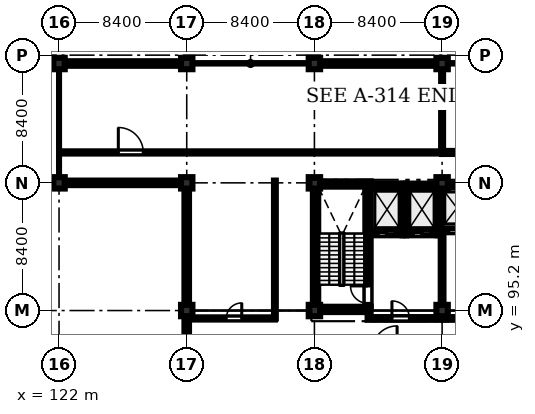
"""IFC4 building model, lengths in metres.
Left out: names, types, materials, properties, quantities, classifications, styles, units other than length and angle.
Written with IfcOpenShell. Run it as: python <this file> out.ifc"""

import sys

from ifc_helpers import new_model, si_unit, direction, frame, frame_2d, origin, origin_2d, place, context, subcontext, project, spatial, rectangle, extrude, element, fill, save


model = new_model("IFC4")
c1 = context("Model", 3, precision=1e-05, world=origin(), true_north=direction((0.0, 1.0)))
c2 = subcontext(c1, "Body", "Model", "MODEL_VIEW")
j1 = project(units=[si_unit("LENGTHUNIT", "METRE"), si_unit("PLANEANGLEUNIT", "RADIAN")], contexts=[c1])
p1 = place(None, origin())
s1 = spatial("IfcSite", under=j1, at=p1, CompositionType="ELEMENT")
p2 = place(p1, origin())
s2 = spatial("IfcBuilding", under=s1, at=p2, CompositionType="ELEMENT")
p3 = place(p2, frame((0.0, 0.0, 48.6)))
s3 = spatial("IfcBuildingStorey", under=s2, at=p3, CompositionType="ELEMENT", Elevation=48.6)
for number, where, z_axis, x_axis in (
    (1, (122.0, 103.6, 0.0), (0.0, 0.0, 1.0), (1.0, 0.0, 0.0)),
    (2, (122.0, 111.45, 0.0), (0.0, 0.0, 1.0), (1.0, 0.0, 0.0)),
    (3, (130.4, 95.2, 0.0), (0.0, 0.0, 1.0), (1.0, 0.0, 0.0)),
    (4, (130.4, 103.6, 0.0), (0.0, 0.0, 1.0), (1.0, 0.0, 0.0)),
    (5, (130.4, 111.45, 0.0), (0.0, 0.0, 1.0), (1.0, 0.0, 0.0)),
    (6, (138.8, 95.2, 0.0), (0.0, 0.0, 1.0), (1.0, 0.0, 0.0)),
    (7, (138.8, 103.6, 0.0), (0.0, 0.0, 1.0), (1.0, 0.0, 0.0)),
    (8, (138.8, 111.45, 0.0), (0.0, 0.0, 1.0), (1.0, 0.0, 0.0)),
    (9, (147.2, 95.2, 0.0), (0.0, 0.0, 1.0), (1.0, 0.0, 0.0)),
    (10, (147.2, 103.6, 0.0), (0.0, 0.0, 1.0), (1.0, 0.0, 0.0)),
    (11, (147.2, 111.45, 0.0), (0.0, 0.0, 1.0), (1.0, 0.0, 0.0)),
):
    element("IfcColumn", number, at=place(p3, frame(where, z_axis=z_axis, x_axis=x_axis)), inside=s3, PredefinedType="COLUMN", context=c2, shape_type="SweptSolid", body=[
        extrude(rectangle(XDim=0.75, YDim=0.75, at=origin_2d()), origin(), (0.0, 0.0, 1.0), 4.03),
    ])
for number, where, z_axis, x_axis in (
    (12, (138.7, 95.275, 0.0), (0.0, 0.0, 1.0), (1.0, 0.0, 0.0)),
    (13, (138.7, 103.525, 0.0), (0.0, 0.0, 1.0), (1.0, 0.0, 0.0)),
):
    element("IfcWall", number, at=place(p3, frame(where, z_axis=z_axis, x_axis=x_axis)), inside=s3, PredefinedType="SHEAR", context=c2, shape_type="SweptSolid", body=[
        extrude(rectangle(XDim=3.8, YDim=0.35, at=frame_2d((1.9, 0.0))), origin(), (0.0, 0.0, 1.0), 4.03),
    ])
p4 = place(p3, frame((138.875, 95.45, 0.0), z_axis=(0.0, 0.0, 1.0), x_axis=(0.0, 1.0, 0.0)))
e14 = element("IfcWall", 14, at=p4, inside=s3, PredefinedType="SHEAR", context=c2, shape_type="SweptSolid", body=[
    extrude(rectangle(XDim=7.9, YDim=0.35, at=frame_2d((3.95, 0.0))), origin(), (0.0, 0.0, 1.0), 4.03),
])
p5 = place(p3, frame((142.325, 95.45, 0.0), z_axis=(0.0, 0.0, 1.0), x_axis=(0.0, 1.0, 0.0)))
e15 = element("IfcWall", 15, at=p5, inside=s3, PredefinedType="SHEAR", context=c2, shape_type="SweptSolid", body=[
    extrude(rectangle(XDim=7.9, YDim=0.35, at=frame_2d((3.95, 0.0))), origin(), (0.0, 0.0, 1.0), 4.03),
])
p6 = place(p5, frame((0.22, 0.0, 0.0)))
e16 = element("IfcOpeningElement", 16, at=p6, cuts=e15, PredefinedType="OPENING", context=c2, shape_type="SweptSolid", body=[
    extrude(rectangle(XDim=1.15, YDim=2.15, at=frame_2d((0.575, 1.075))), frame((0.0, 0.185, 0.0), z_axis=(0.0, -1.0, 0.0), x_axis=(1.0, 0.0, 0.0)), (0.0, 0.0, 1.0), 0.37),
])
p7 = place(p3, frame((142.5, 100.275, 0.0), z_axis=(0.0, 0.0, 1.0), x_axis=(1.0, 0.0, 0.0)))
e17 = element("IfcWall", 17, at=p7, inside=s3, PredefinedType="SHEAR", context=c2, shape_type="SweptSolid", body=[
    extrude(rectangle(XDim=2.1, YDim=0.25, at=frame_2d((1.05, 0.0))), origin(), (0.0, 0.0, 1.0), 4.03),
])
p8 = place(p7, frame((0.5, 0.0, 0.0)))
e18 = element("IfcOpeningElement", 18, at=p8, cuts=e17, PredefinedType="OPENING", context=c2, shape_type="SweptSolid", body=[
    extrude(rectangle(XDim=1.1, YDim=2.15, at=frame_2d((0.55, 1.075))), frame((0.0, 0.135, 0.0), z_axis=(0.0, -1.0, 0.0), x_axis=(1.0, 0.0, 0.0)), (0.0, 0.0, 1.0), 0.27),
])
p9 = place(p3, frame((142.5, 103.425, 0.0), z_axis=(0.0, 0.0, 1.0), x_axis=(1.0, 0.0, 0.0)))
e19 = element("IfcWall", 19, at=p9, inside=s3, PredefinedType="SHEAR", context=c2, shape_type="SweptSolid", body=[
    extrude(rectangle(XDim=2.1, YDim=0.25, at=frame_2d((1.05, 0.0))), origin(), (0.0, 0.0, 1.0), 4.03),
])
p10 = place(p3, frame((144.725, 100.15, 0.0), z_axis=(0.0, 0.0, 1.0), x_axis=(0.0, 1.0, 0.0)))
e20 = element("IfcWall", 20, at=p10, inside=s3, PredefinedType="SHEAR", context=c2, shape_type="SweptSolid", body=[
    extrude(rectangle(XDim=3.4, YDim=0.25, at=frame_2d((1.7, 0.0))), origin(), (0.0, 0.0, 1.0), 4.03),
])
p11 = place(p3, frame((144.85, 100.275, 0.0), z_axis=(0.0, 0.0, 1.0), x_axis=(1.0, 0.0, 0.0)))
e21 = element("IfcWall", 21, at=p11, inside=s3, PredefinedType="SHEAR", context=c2, shape_type="SweptSolid", body=[
    extrude(rectangle(XDim=2.05, YDim=0.25, at=frame_2d((1.025, 0.0))), origin(), (0.0, 0.0, 1.0), 4.03),
])
p12 = place(p11, frame((0.465, 0.0, 0.0)))
e22 = element("IfcOpeningElement", 22, at=p12, cuts=e21, PredefinedType="OPENING", context=c2, shape_type="SweptSolid", body=[
    extrude(rectangle(XDim=1.12, YDim=2.15, at=frame_2d((0.56, 1.075))), frame((0.0, 0.135, 0.0), z_axis=(0.0, -1.0, 0.0), x_axis=(1.0, 0.0, 0.0)), (0.0, 0.0, 1.0), 0.27),
])
p13 = place(p3, frame((144.85, 103.425, 0.0), z_axis=(0.0, 0.0, 1.0), x_axis=(1.0, 0.0, 0.0)))
e23 = element("IfcWall", 23, at=p13, inside=s3, PredefinedType="SHEAR", context=c2, shape_type="SweptSolid", body=[
    extrude(rectangle(XDim=2.05, YDim=0.25, at=frame_2d((1.025, 0.0))), origin(), (0.0, 0.0, 1.0), 4.03),
])
p14 = place(p3, frame((147.025, 100.15, 0.0), z_axis=(0.0, 0.0, 1.0), x_axis=(0.0, 1.0, 0.0)))
e24 = element("IfcWall", 24, at=p14, inside=s3, PredefinedType="SHEAR", context=c2, shape_type="SweptSolid", body=[
    extrude(rectangle(XDim=3.4, YDim=0.25, at=frame_2d((1.7, 0.0))), origin(), (0.0, 0.0, 1.0), 4.03),
])
p15 = place(p3, frame((147.15, 100.475, 0.0), z_axis=(0.0, 0.0, 1.0), x_axis=(1.0, 0.0, 0.0)))
e25 = element("IfcWall", 25, at=p15, inside=s3, PredefinedType="SHEAR", context=c2, shape_type="SweptSolid", body=[
    extrude(rectangle(XDim=2.05, YDim=0.25, at=frame_2d((1.025, 0.0))), origin(), (0.0, 0.0, 1.0), 4.03),
])
p16 = place(p15, frame((0.495, 0.0, 0.0)))
e26 = element("IfcOpeningElement", 26, at=p16, cuts=e25, PredefinedType="OPENING", context=c2, shape_type="SweptSolid", body=[
    extrude(rectangle(XDim=1.06, YDim=2.15, at=frame_2d((0.53, 1.075))), frame((0.0, 0.135, 0.0), z_axis=(0.0, -1.0, 0.0), x_axis=(1.0, 0.0, 0.0)), (0.0, 0.0, 1.0), 0.27),
])
p17 = place(p3, frame((147.15, 103.425, 0.0), z_axis=(0.0, 0.0, 1.0), x_axis=(1.0, 0.0, 0.0)))
e27 = element("IfcWall", 27, at=p17, inside=s3, PredefinedType="SHEAR", context=c2, shape_type="SweptSolid", body=[
    extrude(rectangle(XDim=2.05, YDim=0.25, at=frame_2d((1.025, 0.0))), origin(), (0.0, 0.0, 1.0), 4.03),
])
p18 = place(p3, frame((122.375, 111.45, 0.0), z_axis=(0.0, 0.0, 1.0), x_axis=(1.0, 0.0, 0.0)))
e28 = element("IfcWall", 28, at=p18, inside=s3, PredefinedType="STANDARD", context=c2, shape_type="SweptSolid", body=[
    extrude(rectangle(XDim=7.65, YDim=0.3, at=frame_2d((3.825, 0.0))), origin(), (0.0, 0.0, 1.0), 3.33),
])
p19 = place(p18, frame((0.85, 0.0, 0.9)))
e29 = element("IfcOpeningElement", 29, at=p19, cuts=e28, PredefinedType="OPENING", context=c2, shape_type="SweptSolid", body=[
    extrude(rectangle(XDim=1.6, YDim=2.0, at=frame_2d((0.8, 1.0))), frame((0.0, 0.16, 0.0), z_axis=(0.0, -1.0, 0.0), x_axis=(1.0, 0.0, 0.0)), (0.0, 0.0, 1.0), 0.32),
])
p20 = place(p18, frame((4.65, 0.0, 0.9)))
e30 = element("IfcOpeningElement", 30, at=p20, cuts=e28, PredefinedType="OPENING", context=c2, shape_type="SweptSolid", body=[
    extrude(rectangle(XDim=1.6, YDim=2.0, at=frame_2d((0.8, 1.0))), frame((0.0, 0.16, 0.0), z_axis=(0.0, -1.0, 0.0), x_axis=(1.0, 0.0, 0.0)), (0.0, 0.0, 1.0), 0.32),
])
p21 = place(p3, frame((139.175, 111.45, 0.0), z_axis=(0.0, 0.0, 1.0), x_axis=(1.0, 0.0, 0.0)))
e31 = element("IfcWall", 31, at=p21, inside=s3, PredefinedType="STANDARD", context=c2, shape_type="SweptSolid", body=[
    extrude(rectangle(XDim=7.65, YDim=0.3, at=frame_2d((3.825, 0.0))), origin(), (0.0, 0.0, 1.0), 3.33),
])
p22 = place(p21, frame((0.85, 0.0, 0.9)))
e32 = element("IfcOpeningElement", 32, at=p22, cuts=e31, PredefinedType="OPENING", context=c2, shape_type="SweptSolid", body=[
    extrude(rectangle(XDim=1.6, YDim=2.0, at=frame_2d((0.8, 1.0))), frame((0.0, 0.16, 0.0), z_axis=(0.0, -1.0, 0.0), x_axis=(1.0, 0.0, 0.0)), (0.0, 0.0, 1.0), 0.32),
])
p23 = place(p21, frame((4.65, 0.0, 0.9)))
e33 = element("IfcOpeningElement", 33, at=p23, cuts=e31, PredefinedType="OPENING", context=c2, shape_type="SweptSolid", body=[
    extrude(rectangle(XDim=1.6, YDim=2.0, at=frame_2d((0.8, 1.0))), frame((0.0, 0.16, 0.0), z_axis=(0.0, -1.0, 0.0), x_axis=(1.0, 0.0, 0.0)), (0.0, 0.0, 1.0), 0.32),
])
p24 = place(p3, frame((130.4, 92.15, 0.0), z_axis=(0.0, 0.0, 1.0), x_axis=(0.0, 1.0, 0.0)))
e34 = element("IfcWall", 34, at=p24, inside=s3, PredefinedType="STANDARD", context=c2, shape_type="SweptSolid", body=[
    extrude(rectangle(XDim=2.675, YDim=0.3, at=frame_2d((1.337, 0.0))), origin(), (0.0, 0.0, 1.0), 4.03),
])
p25 = place(p3, frame((130.4, 95.575, 0.0), z_axis=(0.0, 0.0, 1.0), x_axis=(0.0, 1.0, 0.0)))
e35 = element("IfcWall", 35, at=p25, inside=s3, PredefinedType="STANDARD", context=c2, shape_type="SweptSolid", body=[
    extrude(rectangle(XDim=7.65, YDim=0.3, at=frame_2d((3.825, 0.0))), origin(), (0.0, 0.0, 1.0), 3.33),
])
p26 = place(p25, frame((2.4, 0.0, 1.0)))
e36 = element("IfcOpeningElement", 36, at=p26, cuts=e35, PredefinedType="OPENING", context=c2, shape_type="SweptSolid", body=[
    extrude(rectangle(XDim=1.8, YDim=1.8, at=frame_2d((0.9, 0.9))), frame((0.0, 0.16, 0.0), z_axis=(0.0, -1.0, 0.0), x_axis=(1.0, 0.0, 0.0)), (0.0, 0.0, 1.0), 0.32),
])
p27 = place(p3, frame((130.025, 103.6, 0.0), z_axis=(0.0, 0.0, 1.0), x_axis=(-1.0, 0.0, 0.0)))
e37 = element("IfcWall", 37, at=p27, inside=s3, PredefinedType="STANDARD", context=c2, shape_type="SweptSolid", body=[
    extrude(rectangle(XDim=7.65, YDim=0.3, at=frame_2d((3.825, 0.0))), origin(), (0.0, 0.0, 1.0), 3.33),
])
p28 = place(p3, frame((142.3, 94.68, 0.0), z_axis=(0.0, 0.0, 1.0), x_axis=(1.0, 0.0, 0.0)))
e38 = element("IfcWall", 38, at=p28, inside=s3, PredefinedType="STANDARD", context=c2, shape_type="SweptSolid", body=[
    extrude(rectangle(XDim=4.8, YDim=0.18, at=frame_2d((2.4, 0.0))), origin(), (0.0, 0.0, 1.0), 4.03),
])
p29 = place(p28, frame((1.6, 0.0, 0.0)))
e39 = element("IfcOpeningElement", 39, at=p29, cuts=e38, PredefinedType="OPENING", context=c2, shape_type="SweptSolid", body=[
    extrude(rectangle(XDim=1.15, YDim=2.15, at=frame_2d((0.575, 1.075))), frame((0.0, 0.1, 0.0), z_axis=(0.0, -1.0, 0.0), x_axis=(1.0, 0.0, 0.0)), (0.0, 0.0, 1.0), 0.2),
])
p30 = place(p3, frame((147.3, 94.68, 0.0), z_axis=(0.0, 0.0, 1.0), x_axis=(1.0, 0.0, 0.0)))
e40 = element("IfcWall", 40, at=p30, inside=s3, PredefinedType="STANDARD", context=c2, shape_type="SweptSolid", body=[
    extrude(rectangle(XDim=4.85, YDim=0.18, at=frame_2d((2.425, 0.0))), origin(), (0.0, 0.0, 1.0), 4.03),
])
p31 = place(p30, frame((1.6, 0.0, 0.0)))
e41 = element("IfcOpeningElement", 41, at=p31, cuts=e40, PredefinedType="OPENING", context=c2, shape_type="SweptSolid", body=[
    extrude(rectangle(XDim=1.15, YDim=2.15, at=frame_2d((0.575, 1.075))), frame((0.0, 0.1, 0.0), z_axis=(0.0, -1.0, 0.0), x_axis=(1.0, 0.0, 0.0)), (0.0, 0.0, 1.0), 0.2),
])
p32 = place(p3, frame((147.2, 95.75, 0.0), z_axis=(0.0, 0.0, 1.0), x_axis=(0.0, 1.0, 0.0)))
e42 = element("IfcWall", 42, at=p32, inside=s3, PredefinedType="STANDARD", context=c2, shape_type="SweptSolid", body=[
    extrude(rectangle(XDim=4.5, YDim=0.18, at=frame_2d((2.25, 0.0))), origin(), (0.0, 0.0, 1.0), 3.33),
])
p33 = place(p3, frame((136.2, 94.68, 0.0), z_axis=(0.0, 0.0, 1.0), x_axis=(0.0, 1.0, 0.0)))
e43 = element("IfcWall", 43, at=p33, inside=s3, PredefinedType="PARTITIONING", context=c2, shape_type="SweptSolid", body=[
    extrude(rectangle(XDim=9.07, YDim=0.12, at=frame_2d((4.535, 0.0))), origin(), (0.0, 0.0, 1.0), 4.03),
])
p34 = place(p3, frame((130.8, 94.68, 0.0), z_axis=(0.0, 0.0, 1.0), x_axis=(1.0, 0.0, 0.0)))
e44 = element("IfcWall", 44, at=p34, inside=s3, PredefinedType="PARTITIONING", context=c2, shape_type="SweptSolid", body=[
    extrude(rectangle(XDim=5.4, YDim=0.145, at=frame_2d((2.7, 0.0))), origin(), (0.0, 0.0, 1.0), 4.03),
])
p35 = place(p34, frame((2.2, 0.0, 0.0)))
e45 = element("IfcOpeningElement", 45, at=p35, cuts=e44, PredefinedType="OPENING", context=c2, shape_type="SweptSolid", body=[
    extrude(rectangle(XDim=1.02, YDim=2.15, at=frame_2d((0.51, 1.075))), frame((0.0, 0.083, 0.0), z_axis=(0.0, -1.0, 0.0), x_axis=(1.0, 0.0, 0.0)), (0.0, 0.0, 1.0), 0.165),
])
p36 = place(p3, frame((122.15, 105.6, 0.0), z_axis=(0.0, 0.0, 1.0), x_axis=(1.0, 0.0, 0.0)))
e46 = element("IfcWall", 46, at=p36, inside=s3, PredefinedType="PARTITIONING", context=c2, shape_type="SweptSolid", body=[
    extrude(rectangle(XDim=25.05, YDim=0.145, at=frame_2d((12.525, 0.0))), origin(), (0.0, 0.0, 1.0), 4.03),
])
p37 = place(p36, frame((3.75, 0.0, 0.0)))
e47 = element("IfcOpeningElement", 47, at=p37, cuts=e46, PredefinedType="OPENING", context=c2, shape_type="SweptSolid", body=[
    extrude(rectangle(XDim=1.64, YDim=2.24, at=frame_2d((0.82, 1.12))), frame((0.0, 0.083, 0.0), z_axis=(0.0, -1.0, 0.0), x_axis=(1.0, 0.0, 0.0)), (0.0, 0.0, 1.0), 0.165),
])
p38 = place(p3, frame((147.2, 105.6, 0.0), z_axis=(0.0, 0.0, 1.0), x_axis=(1.0, 0.0, 0.0)))
e48 = element("IfcWall", 48, at=p38, inside=s3, PredefinedType="SOLIDWALL", context=c2, shape_type="SweptSolid", body=[
    extrude(rectangle(XDim=16.15, YDim=0.2, at=frame_2d((8.075, 0.0))), origin(), (0.0, 0.0, 1.0), 4.03),
])
p39 = place(p38, frame((3.4, 0.0, 0.0)))
e49 = element("IfcOpeningElement", 49, at=p39, cuts=e48, PredefinedType="OPENING", context=c2, shape_type="SweptSolid", body=[
    extrude(rectangle(XDim=1.5, YDim=2.2, at=frame_2d((0.75, 1.1))), frame((0.0, 0.11, 0.0), z_axis=(0.0, -1.0, 0.0), x_axis=(1.0, 0.0, 0.0)), (0.0, 0.0, 1.0), 0.22),
])
p40 = place(p3, frame((147.2, 105.6, 0.0), z_axis=(0.0, 0.0, 1.0), x_axis=(0.0, 1.0, 0.0)))
e50 = element("IfcWall", 50, at=p40, inside=s3, PredefinedType="PARTITIONING", context=c2, shape_type="SweptSolid", body=[
    extrude(rectangle(XDim=5.75, YDim=0.128, at=frame_2d((2.875, 0.0))), origin(), (0.0, 0.0, 1.0), 3.33),
])
p41 = place(p19, origin())
e51 = element("IfcWindow", 51, at=p41, inside=s3, PartitioningType="DOUBLE_PANEL_VERTICAL", PredefinedType="WINDOW", context=c2, shape_type="SweptSolid", body=[
    extrude(rectangle(XDim=1.6, YDim=2.0, at=frame_2d((0.8, 1.0))), frame((0.0, 0.03, 0.0), z_axis=(0.0, -1.0, 0.0), x_axis=(1.0, 0.0, 0.0)), (0.0, 0.0, 1.0), 0.06),
])
fill(e29, e51)
p42 = place(p20, origin())
e52 = element("IfcWindow", 52, at=p42, inside=s3, PartitioningType="DOUBLE_PANEL_VERTICAL", PredefinedType="WINDOW", context=c2, shape_type="SweptSolid", body=[
    extrude(rectangle(XDim=1.6, YDim=2.0, at=frame_2d((0.8, 1.0))), frame((0.0, 0.03, 0.0), z_axis=(0.0, -1.0, 0.0), x_axis=(1.0, 0.0, 0.0)), (0.0, 0.0, 1.0), 0.06),
])
fill(e30, e52)
p43 = place(p22, origin())
e53 = element("IfcWindow", 53, at=p43, inside=s3, PartitioningType="DOUBLE_PANEL_VERTICAL", PredefinedType="WINDOW", context=c2, shape_type="SweptSolid", body=[
    extrude(rectangle(XDim=1.6, YDim=2.0, at=frame_2d((0.8, 1.0))), frame((0.0, 0.03, 0.0), z_axis=(0.0, -1.0, 0.0), x_axis=(1.0, 0.0, 0.0)), (0.0, 0.0, 1.0), 0.06),
])
fill(e32, e53)
p44 = place(p23, origin())
e54 = element("IfcWindow", 54, at=p44, inside=s3, PartitioningType="DOUBLE_PANEL_VERTICAL", PredefinedType="WINDOW", context=c2, shape_type="SweptSolid", body=[
    extrude(rectangle(XDim=1.6, YDim=2.0, at=frame_2d((0.8, 1.0))), frame((0.0, 0.03, 0.0), z_axis=(0.0, -1.0, 0.0), x_axis=(1.0, 0.0, 0.0)), (0.0, 0.0, 1.0), 0.06),
])
fill(e33, e54)
p45 = place(p26, origin())
e55 = element("IfcWindow", 55, at=p45, inside=s3, PartitioningType="DOUBLE_PANEL_VERTICAL", PredefinedType="WINDOW", context=c2, shape_type="SweptSolid", body=[
    extrude(rectangle(XDim=1.8, YDim=1.8, at=frame_2d((0.9, 0.9))), frame((0.0, 0.03, 0.0), z_axis=(0.0, -1.0, 0.0), x_axis=(1.0, 0.0, 0.0)), (0.0, 0.0, 1.0), 0.06),
])
fill(e36, e55)
p46 = place(p29, origin())
e56 = element("IfcDoor", 56, at=p46, inside=s3, OperationType="SINGLE_SWING_LEFT", PredefinedType="DOOR", context=c2, shape_type="SweptSolid", body=[
    extrude(rectangle(XDim=1.15, YDim=2.15, at=frame_2d((0.575, 1.075))), frame((0.0, 0.025, 0.0), z_axis=(0.0, -1.0, 0.0), x_axis=(1.0, 0.0, 0.0)), (0.0, 0.0, 1.0), 0.05),
])
fill(e39, e56)
p47 = place(p35, origin())
e57 = element("IfcDoor", 57, at=p47, inside=s3, OperationType="SINGLE_SWING_RIGHT", PredefinedType="DOOR", context=c2, shape_type="SweptSolid", body=[
    extrude(rectangle(XDim=1.02, YDim=2.15, at=frame_2d((0.51, 1.075))), frame((0.0, 0.025, 0.0), z_axis=(0.0, -1.0, 0.0), x_axis=(1.0, 0.0, 0.0)), (0.0, 0.0, 1.0), 0.05),
])
fill(e45, e57)
p48 = place(p37, origin())
e58 = element("IfcDoor", 58, at=p48, inside=s3, OperationType="SINGLE_SWING_LEFT", PredefinedType="DOOR", context=c2, shape_type="SweptSolid", body=[
    extrude(rectangle(XDim=1.64, YDim=2.24, at=frame_2d((0.82, 1.12))), frame((0.0, 0.025, 0.0), z_axis=(0.0, -1.0, 0.0), x_axis=(1.0, 0.0, 0.0)), (0.0, 0.0, 1.0), 0.05),
])
fill(e47, e58)
p49 = place(p6, origin())
e59 = element("IfcDoor", 59, at=p49, inside=s3, OperationType="SINGLE_SWING_RIGHT", PredefinedType="DOOR", context=c2, shape_type="SweptSolid", body=[
    extrude(rectangle(XDim=1.15, YDim=2.15, at=frame_2d((0.575, 1.075))), frame((0.0, 0.025, 0.0), z_axis=(0.0, -1.0, 0.0), x_axis=(1.0, 0.0, 0.0)), (0.0, 0.0, 1.0), 0.05),
])
fill(e16, e59)
p50 = place(p8, origin())
e60 = element("IfcDoor", 60, at=p50, inside=s3, OperationType="SLIDING_TO_LEFT", PredefinedType="DOOR", context=c2, shape_type="SweptSolid", body=[
    extrude(rectangle(XDim=1.1, YDim=2.15, at=frame_2d((0.55, 1.075))), frame((0.0, 0.025, 0.0), z_axis=(0.0, -1.0, 0.0), x_axis=(1.0, 0.0, 0.0)), (0.0, 0.0, 1.0), 0.05),
])
fill(e18, e60)
p51 = place(p12, origin())
e61 = element("IfcDoor", 61, at=p51, inside=s3, OperationType="SLIDING_TO_LEFT", PredefinedType="DOOR", context=c2, shape_type="SweptSolid", body=[
    extrude(rectangle(XDim=1.12, YDim=2.15, at=frame_2d((0.56, 1.075))), frame((0.0, 0.025, 0.0), z_axis=(0.0, -1.0, 0.0), x_axis=(1.0, 0.0, 0.0)), (0.0, 0.0, 1.0), 0.05),
])
fill(e22, e61)
p52 = place(p16, origin())
e62 = element("IfcDoor", 62, at=p52, inside=s3, OperationType="SLIDING_TO_LEFT", PredefinedType="DOOR", context=c2, shape_type="SweptSolid", body=[
    extrude(rectangle(XDim=1.06, YDim=2.15, at=frame_2d((0.53, 1.075))), frame((0.0, 0.025, 0.0), z_axis=(0.0, -1.0, 0.0), x_axis=(1.0, 0.0, 0.0)), (0.0, 0.0, 1.0), 0.05),
])
fill(e26, e62)
save(model, sys.argv[1])
